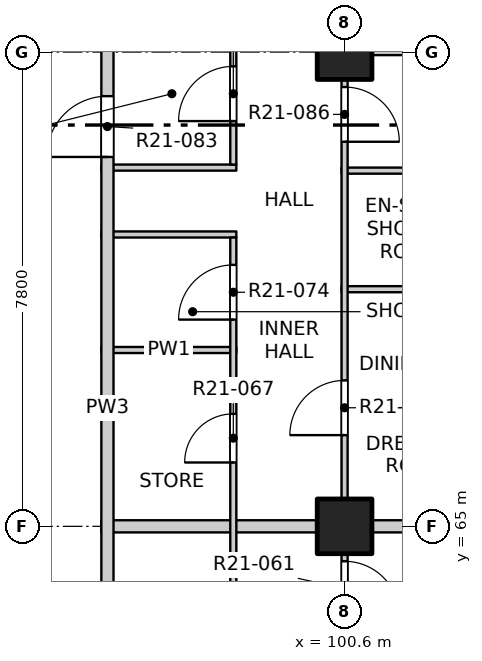
"""IFC4 building model, lengths in metres.
Left out: names, types, materials, properties, quantities, classifications, styles, units other than length and angle.
Written with IfcOpenShell. Run it as: python <this file> out.ifc"""

import sys

from ifc_helpers import new_model, si_unit, direction, frame, frame_2d, origin, origin_2d, place, context, subcontext, project, spatial, rectangle, extrude, element, fill, save


model = new_model("IFC4")
c1 = context("Model", 3, precision=1e-05, world=origin(), true_north=direction((0.0, 1.0)))
c2 = subcontext(c1, "Body", "Model", "MODEL_VIEW")
j1 = project(units=[si_unit("LENGTHUNIT", "METRE"), si_unit("PLANEANGLEUNIT", "RADIAN")], contexts=[c1])
p1 = place(None, origin())
s1 = spatial("IfcSite", under=j1, at=p1, CompositionType="ELEMENT")
p2 = place(p1, origin())
s2 = spatial("IfcBuilding", under=s1, at=p2, CompositionType="ELEMENT")
p3 = place(p2, frame((0.0, 0.0, 221.1)))
s3 = spatial("IfcBuildingStorey", under=s2, at=p3, CompositionType="ELEMENT", Elevation=221.1)
for number, where, z_axis, x_axis in (
    (1, (100.6, 65.0, -0.25), (0.0, 0.0, 1.0), (1.0, 0.0, 0.0)),
    (2, (100.6, 72.8, -0.25), (0.0, 0.0, 1.0), (1.0, 0.0, 0.0)),
):
    element("IfcColumn", number, at=place(p3, frame(where, z_axis=z_axis, x_axis=x_axis)), inside=s3, PredefinedType="COLUMN", context=c2, shape_type="SweptSolid", body=[
        extrude(rectangle(XDim=0.9, YDim=0.9, at=origin_2d()), origin(), (0.0, 0.0, 1.0), 3.4),
    ])
p4 = place(p3, frame((96.6, 65.0, 0.0), z_axis=(0.0, 0.0, 1.0), x_axis=(1.0, 0.0, 0.0)))
e3 = element("IfcWall", 3, at=p4, inside=s3, PredefinedType="PARTITIONING", context=c2, shape_type="SweptSolid", body=[
    extrude(rectangle(XDim=11.5, YDim=0.2, at=frame_2d((5.75, 0.0))), origin(), (0.0, 0.0, 1.0), 3.15),
])
p5 = place(p3, frame((96.6, 67.9, 0.0), z_axis=(0.0, 0.0, 1.0), x_axis=(1.0, 0.0, 0.0)))
e4 = element("IfcWall", 4, at=p5, inside=s3, PredefinedType="PARTITIONING", context=c2, shape_type="SweptSolid", body=[
    extrude(rectangle(XDim=2.22, YDim=0.1, at=frame_2d((1.11, 0.0))), origin(), (0.0, 0.0, 1.0), 3.15),
])
p6 = place(p3, frame((100.55, 68.9, 0.0), z_axis=(0.0, 0.0, 1.0), x_axis=(1.0, 0.0, 0.0)))
e5 = element("IfcWall", 5, at=p6, inside=s3, PredefinedType="PARTITIONING", context=c2, shape_type="SweptSolid", body=[
    extrude(rectangle(XDim=7.55, YDim=0.1, at=frame_2d((3.775, 0.0))), origin(), (0.0, 0.0, 1.0), 2.55),
])
p7 = place(p3, frame((96.6, 69.8, 0.0), z_axis=(0.0, 0.0, 1.0), x_axis=(1.0, 0.0, 0.0)))
e6 = element("IfcWall", 6, at=p7, inside=s3, PredefinedType="PARTITIONING", context=c2, shape_type="SweptSolid", body=[
    extrude(rectangle(XDim=2.22, YDim=0.1, at=frame_2d((1.11, 0.0))), origin(), (0.0, 0.0, 1.0), 3.15),
])
p8 = place(p3, frame((100.55, 70.85, 0.0), z_axis=(0.0, 0.0, 1.0), x_axis=(1.0, 0.0, 0.0)))
e7 = element("IfcWall", 7, at=p8, inside=s3, PredefinedType="PARTITIONING", context=c2, shape_type="SweptSolid", body=[
    extrude(rectangle(XDim=3.4, YDim=0.1, at=frame_2d((1.7, 0.0))), origin(), (0.0, 0.0, 1.0), 3.15),
])
p9 = place(p3, frame((96.6, 70.9, 0.0), z_axis=(0.0, 0.0, 1.0), x_axis=(1.0, 0.0, 0.0)))
e8 = element("IfcWall", 8, at=p9, inside=s3, PredefinedType="PARTITIONING", context=c2, shape_type="SweptSolid", body=[
    extrude(rectangle(XDim=2.22, YDim=0.1, at=frame_2d((1.11, 0.0))), origin(), (0.0, 0.0, 1.0), 3.15),
])
p10 = place(p3, frame((100.55, 72.8, 0.0), z_axis=(0.0, 0.0, 1.0), x_axis=(1.0, 0.0, 0.0)))
e9 = element("IfcWall", 9, at=p10, inside=s3, PredefinedType="PARTITIONING", context=c2, shape_type="SweptSolid", body=[
    extrude(rectangle(XDim=7.55, YDim=0.1, at=frame_2d((3.775, 0.0))), origin(), (0.0, 0.0, 1.0), 3.15),
])
p11 = place(p3, frame((96.7, 49.5, 0.0), z_axis=(0.0, 0.0, 1.0), x_axis=(0.0, 1.0, 0.0)))
e10 = element("IfcWall", 10, at=p11, inside=s3, PredefinedType="PARTITIONING", context=c2, shape_type="SweptSolid", body=[
    extrude(rectangle(XDim=34.9, YDim=0.2, at=frame_2d((17.45, 0.0))), origin(), (0.0, 0.0, 1.0), 3.15),
])
p12 = place(p11, frame((3.275, 0.0, 0.0)))
e11 = element("IfcOpeningElement", 11, at=p12, cuts=e10, PredefinedType="OPENING", context=c2, shape_type="SweptSolid", body=[
    extrude(rectangle(XDim=1.0, YDim=2.1, at=frame_2d((0.5, 1.05))), frame((0.0, 0.11, 0.0), z_axis=(0.0, -1.0, 0.0), x_axis=(1.0, 0.0, 0.0)), (0.0, 0.0, 1.0), 0.22),
])
p13 = place(p11, frame((10.825, 0.0, 0.0)))
e12 = element("IfcOpeningElement", 12, at=p13, cuts=e10, PredefinedType="OPENING", context=c2, shape_type="SweptSolid", body=[
    extrude(rectangle(XDim=1.0, YDim=2.1, at=frame_2d((0.5, 1.05))), frame((0.0, 0.11, 0.0), z_axis=(0.0, -1.0, 0.0), x_axis=(1.0, 0.0, 0.0)), (0.0, 0.0, 1.0), 0.22),
])
p14 = place(p11, frame((21.575, 0.0, 0.0)))
e13 = element("IfcOpeningElement", 13, at=p14, cuts=e10, PredefinedType="OPENING", context=c2, shape_type="SweptSolid", body=[
    extrude(rectangle(XDim=1.0, YDim=2.1, at=frame_2d((0.5, 1.05))), frame((0.0, 0.11, 0.0), z_axis=(0.0, -1.0, 0.0), x_axis=(1.0, 0.0, 0.0)), (0.0, 0.0, 1.0), 0.22),
])
p15 = place(p11, frame((30.575, 0.0, 0.0)))
e14 = element("IfcOpeningElement", 14, at=p15, cuts=e10, PredefinedType="OPENING", context=c2, shape_type="SweptSolid", body=[
    extrude(rectangle(XDim=1.0, YDim=2.1, at=frame_2d((0.5, 1.05))), frame((0.0, 0.11, 0.0), z_axis=(0.0, -1.0, 0.0), x_axis=(1.0, 0.0, 0.0)), (0.0, 0.0, 1.0), 0.22),
])
p16 = place(p3, frame((98.77, 60.2, 0.0), z_axis=(0.0, 0.0, 1.0), x_axis=(0.0, 1.0, 0.0)))
e15 = element("IfcWall", 15, at=p16, inside=s3, PredefinedType="PARTITIONING", context=c2, shape_type="SweptSolid", body=[
    extrude(rectangle(XDim=9.55, YDim=0.1, at=frame_2d((4.775, 0.0))), origin(), (0.0, 0.0, 1.0), 3.15),
])
p17 = place(p16, frame((0.55, 0.0, 0.0)))
e16 = element("IfcOpeningElement", 16, at=p17, cuts=e15, PredefinedType="OPENING", context=c2, shape_type="SweptSolid", body=[
    extrude(rectangle(XDim=0.8, YDim=2.1, at=frame_2d((0.4, 1.05))), frame((0.0, 0.06, 0.0), z_axis=(0.0, -1.0, 0.0), x_axis=(1.0, 0.0, 0.0)), (0.0, 0.0, 1.0), 0.12),
])
p18 = place(p16, frame((2.925, 0.0, 0.0)))
e17 = element("IfcOpeningElement", 17, at=p18, cuts=e15, PredefinedType="OPENING", context=c2, shape_type="SweptSolid", body=[
    extrude(rectangle(XDim=0.9, YDim=2.1, at=frame_2d((0.45, 1.05))), frame((0.0, 0.06, 0.0), z_axis=(0.0, -1.0, 0.0), x_axis=(1.0, 0.0, 0.0)), (0.0, 0.0, 1.0), 0.12),
])
p19 = place(p16, frame((5.85, 0.0, 0.0)))
e18 = element("IfcOpeningElement", 18, at=p19, cuts=e15, PredefinedType="OPENING", context=c2, shape_type="SweptSolid", body=[
    extrude(rectangle(XDim=0.8, YDim=2.1, at=frame_2d((0.4, 1.05))), frame((0.0, 0.06, 0.0), z_axis=(0.0, -1.0, 0.0), x_axis=(1.0, 0.0, 0.0)), (0.0, 0.0, 1.0), 0.12),
])
p20 = place(p16, frame((8.2, 0.0, 0.0)))
e19 = element("IfcOpeningElement", 19, at=p20, cuts=e15, PredefinedType="OPENING", context=c2, shape_type="SweptSolid", body=[
    extrude(rectangle(XDim=0.9, YDim=2.1, at=frame_2d((0.45, 1.05))), frame((0.0, 0.06, 0.0), z_axis=(0.0, -1.0, 0.0), x_axis=(1.0, 0.0, 0.0)), (0.0, 0.0, 1.0), 0.12),
])
p21 = place(p3, frame((98.77, 70.95, 0.0), z_axis=(0.0, 0.0, 1.0), x_axis=(0.0, 1.0, 0.0)))
e20 = element("IfcWall", 20, at=p21, inside=s3, PredefinedType="PARTITIONING", context=c2, shape_type="SweptSolid", body=[
    extrude(rectangle(XDim=7.8, YDim=0.1, at=frame_2d((3.9, 0.0))), origin(), (0.0, 0.0, 1.0), 3.15),
])
p22 = place(p21, frame((0.715, 0.0, 0.0)))
e21 = element("IfcOpeningElement", 21, at=p22, cuts=e20, PredefinedType="OPENING", context=c2, shape_type="SweptSolid", body=[
    extrude(rectangle(XDim=0.9, YDim=2.1, at=frame_2d((0.45, 1.05))), frame((0.0, 0.06, 0.0), z_axis=(0.0, -1.0, 0.0), x_axis=(1.0, 0.0, 0.0)), (0.0, 0.0, 1.0), 0.12),
])
p23 = place(p21, frame((3.615, 0.0, 0.0)))
e22 = element("IfcOpeningElement", 22, at=p23, cuts=e20, PredefinedType="OPENING", context=c2, shape_type="SweptSolid", body=[
    extrude(rectangle(XDim=0.9, YDim=2.1, at=frame_2d((0.45, 1.05))), frame((0.0, 0.06, 0.0), z_axis=(0.0, -1.0, 0.0), x_axis=(1.0, 0.0, 0.0)), (0.0, 0.0, 1.0), 0.12),
])
p24 = place(p21, frame((6.35, 0.0, 0.0)))
e23 = element("IfcOpeningElement", 23, at=p24, cuts=e20, PredefinedType="OPENING", context=c2, shape_type="SweptSolid", body=[
    extrude(rectangle(XDim=0.9, YDim=2.1, at=frame_2d((0.45, 1.05))), frame((0.0, 0.06, 0.0), z_axis=(0.0, -1.0, 0.0), x_axis=(1.0, 0.0, 0.0)), (0.0, 0.0, 1.0), 0.12),
])
p25 = place(p3, frame((100.6, 41.9, 0.0), z_axis=(0.0, 0.0, 1.0), x_axis=(0.0, 1.0, 0.0)))
e24 = element("IfcWall", 24, at=p25, inside=s3, PredefinedType="PARTITIONING", context=c2, shape_type="SweptSolid", body=[
    extrude(rectangle(XDim=46.2, YDim=0.1, at=frame_2d((23.1, 0.0))), origin(), (0.0, 0.0, 1.0), 3.15),
])
p26 = place(p25, frame((1.2, 0.0, 0.0)))
e25 = element("IfcOpeningElement", 25, at=p26, cuts=e24, PredefinedType="OPENING", context=c2, shape_type="SweptSolid", body=[
    extrude(rectangle(XDim=0.9, YDim=2.1, at=frame_2d((0.45, 1.05))), frame((0.0, 0.06, 0.0), z_axis=(0.0, -1.0, 0.0), x_axis=(1.0, 0.0, 0.0)), (0.0, 0.0, 1.0), 0.12),
])
p27 = place(p25, frame((6.025, 0.0, 0.0)))
e26 = element("IfcOpeningElement", 26, at=p27, cuts=e24, PredefinedType="OPENING", context=c2, shape_type="SweptSolid", body=[
    extrude(rectangle(XDim=0.9, YDim=2.1, at=frame_2d((0.45, 1.05))), frame((0.0, 0.06, 0.0), z_axis=(0.0, -1.0, 0.0), x_axis=(1.0, 0.0, 0.0)), (0.0, 0.0, 1.0), 0.12),
])
p28 = place(p25, frame((9.0, 0.0, 0.0)))
e27 = element("IfcOpeningElement", 27, at=p28, cuts=e24, PredefinedType="OPENING", context=c2, shape_type="SweptSolid", body=[
    extrude(rectangle(XDim=0.9, YDim=2.1, at=frame_2d((0.45, 1.05))), frame((0.0, 0.06, 0.0), z_axis=(0.0, -1.0, 0.0), x_axis=(1.0, 0.0, 0.0)), (0.0, 0.0, 1.0), 0.12),
])
p29 = place(p25, frame((13.85, 0.0, 0.0)))
e28 = element("IfcOpeningElement", 28, at=p29, cuts=e24, PredefinedType="OPENING", context=c2, shape_type="SweptSolid", body=[
    extrude(rectangle(XDim=0.9, YDim=2.1, at=frame_2d((0.45, 1.05))), frame((0.0, 0.06, 0.0), z_axis=(0.0, -1.0, 0.0), x_axis=(1.0, 0.0, 0.0)), (0.0, 0.0, 1.0), 0.12),
])
p30 = place(p25, frame((16.8, 0.0, 0.0)))
e29 = element("IfcOpeningElement", 29, at=p30, cuts=e24, PredefinedType="OPENING", context=c2, shape_type="SweptSolid", body=[
    extrude(rectangle(XDim=0.9, YDim=2.1, at=frame_2d((0.45, 1.05))), frame((0.0, 0.06, 0.0), z_axis=(0.0, -1.0, 0.0), x_axis=(1.0, 0.0, 0.0)), (0.0, 0.0, 1.0), 0.12),
])
p31 = place(p25, frame((21.625, 0.0, 0.0)))
e30 = element("IfcOpeningElement", 30, at=p31, cuts=e24, PredefinedType="OPENING", context=c2, shape_type="SweptSolid", body=[
    extrude(rectangle(XDim=0.9, YDim=2.1, at=frame_2d((0.45, 1.05))), frame((0.0, 0.06, 0.0), z_axis=(0.0, -1.0, 0.0), x_axis=(1.0, 0.0, 0.0)), (0.0, 0.0, 1.0), 0.12),
])
p32 = place(p25, frame((24.6, 0.0, 0.0)))
e31 = element("IfcOpeningElement", 31, at=p32, cuts=e24, PredefinedType="OPENING", context=c2, shape_type="SweptSolid", body=[
    extrude(rectangle(XDim=0.9, YDim=2.1, at=frame_2d((0.45, 1.05))), frame((0.0, 0.06, 0.0), z_axis=(0.0, -1.0, 0.0), x_axis=(1.0, 0.0, 0.0)), (0.0, 0.0, 1.0), 0.12),
])
p33 = place(p25, frame((29.425, 0.0, 0.0)))
e32 = element("IfcOpeningElement", 32, at=p33, cuts=e24, PredefinedType="OPENING", context=c2, shape_type="SweptSolid", body=[
    extrude(rectangle(XDim=0.9, YDim=2.1, at=frame_2d((0.45, 1.05))), frame((0.0, 0.06, 0.0), z_axis=(0.0, -1.0, 0.0), x_axis=(1.0, 0.0, 0.0)), (0.0, 0.0, 1.0), 0.12),
])
p34 = place(p25, frame((33.375, 0.0, 0.0)))
e33 = element("IfcOpeningElement", 33, at=p34, cuts=e24, PredefinedType="OPENING", context=c2, shape_type="SweptSolid", body=[
    extrude(rectangle(XDim=0.9, YDim=2.1, at=frame_2d((0.45, 1.05))), frame((0.0, 0.06, 0.0), z_axis=(0.0, -1.0, 0.0), x_axis=(1.0, 0.0, 0.0)), (0.0, 0.0, 1.0), 0.12),
])
p35 = place(p25, frame((36.3, 0.0, 0.0)))
e34 = element("IfcOpeningElement", 34, at=p35, cuts=e24, PredefinedType="OPENING", context=c2, shape_type="SweptSolid", body=[
    extrude(rectangle(XDim=0.9, YDim=2.1, at=frame_2d((0.45, 1.05))), frame((0.0, 0.06, 0.0), z_axis=(0.0, -1.0, 0.0), x_axis=(1.0, 0.0, 0.0)), (0.0, 0.0, 1.0), 0.12),
])
p36 = place(p25, frame((41.175, 0.0, 0.0)))
e35 = element("IfcOpeningElement", 35, at=p36, cuts=e24, PredefinedType="OPENING", context=c2, shape_type="SweptSolid", body=[
    extrude(rectangle(XDim=0.9, YDim=2.1, at=frame_2d((0.45, 1.05))), frame((0.0, 0.06, 0.0), z_axis=(0.0, -1.0, 0.0), x_axis=(1.0, 0.0, 0.0)), (0.0, 0.0, 1.0), 0.12),
])
p37 = place(p25, frame((44.1, 0.0, 0.0)))
e36 = element("IfcOpeningElement", 36, at=p37, cuts=e24, PredefinedType="OPENING", context=c2, shape_type="SweptSolid", body=[
    extrude(rectangle(XDim=0.9, YDim=2.1, at=frame_2d((0.45, 1.05))), frame((0.0, 0.06, 0.0), z_axis=(0.0, -1.0, 0.0), x_axis=(1.0, 0.0, 0.0)), (0.0, 0.0, 1.0), 0.12),
])
p38 = place(p31, origin())
e37 = element("IfcDoor", 37, at=p38, inside=s3, OperationType="SINGLE_SWING_RIGHT", PredefinedType="DOOR", context=c2, shape_type="SweptSolid", body=[
    extrude(rectangle(XDim=0.9, YDim=2.1, at=frame_2d((0.45, 1.05))), frame((0.0, 0.025, 0.0), z_axis=(0.0, -1.0, 0.0), x_axis=(1.0, 0.0, 0.0)), (0.0, 0.0, 1.0), 0.05),
])
fill(e30, e37)
p39 = place(p19, origin())
e38 = element("IfcDoor", 38, at=p39, inside=s3, OperationType="SINGLE_SWING_LEFT", PredefinedType="DOOR", context=c2, shape_type="SweptSolid", body=[
    extrude(rectangle(XDim=0.8, YDim=2.1, at=frame_2d((0.4, 1.05))), frame((0.0, 0.025, 0.0), z_axis=(0.0, -1.0, 0.0), x_axis=(1.0, 0.0, 0.0)), (0.0, 0.0, 1.0), 0.05),
])
fill(e18, e38)
p40 = place(p32, origin())
e39 = element("IfcDoor", 39, at=p40, inside=s3, OperationType="SINGLE_SWING_LEFT", PredefinedType="DOOR", context=c2, shape_type="SweptSolid", body=[
    extrude(rectangle(XDim=0.9, YDim=2.1, at=frame_2d((0.45, 1.05))), frame((0.0, 0.025, 0.0), z_axis=(0.0, -1.0, 0.0), x_axis=(1.0, 0.0, 0.0)), (0.0, 0.0, 1.0), 0.05),
])
fill(e31, e39)
p41 = place(p20, origin())
e40 = element("IfcDoor", 40, at=p41, inside=s3, OperationType="SINGLE_SWING_LEFT", PredefinedType="DOOR", context=c2, shape_type="SweptSolid", body=[
    extrude(rectangle(XDim=0.9, YDim=2.1, at=frame_2d((0.45, 1.05))), frame((0.0, 0.025, 0.0), z_axis=(0.0, -1.0, 0.0), x_axis=(1.0, 0.0, 0.0)), (0.0, 0.0, 1.0), 0.05),
])
fill(e19, e40)
p42 = place(p14, origin())
e41 = element("IfcDoor", 41, at=p42, inside=s3, OperationType="SINGLE_SWING_LEFT", PredefinedType="DOOR", context=c2, shape_type="SweptSolid", body=[
    extrude(rectangle(XDim=1.0, YDim=2.1, at=frame_2d((0.5, 1.05))), frame((0.0, 0.025, 0.0), z_axis=(0.0, -1.0, 0.0), x_axis=(1.0, 0.0, 0.0)), (0.0, 0.0, 1.0), 0.05),
])
fill(e13, e41)
p43 = place(p33, origin())
e42 = element("IfcDoor", 42, at=p43, inside=s3, OperationType="SINGLE_SWING_RIGHT", PredefinedType="DOOR", context=c2, shape_type="SweptSolid", body=[
    extrude(rectangle(XDim=0.9, YDim=2.1, at=frame_2d((0.45, 1.05))), frame((0.0, 0.025, 0.0), z_axis=(0.0, -1.0, 0.0), x_axis=(1.0, 0.0, 0.0)), (0.0, 0.0, 1.0), 0.05),
])
fill(e32, e42)
p44 = place(p22, origin())
e43 = element("IfcDoor", 43, at=p44, inside=s3, OperationType="SINGLE_SWING_LEFT", PredefinedType="DOOR", context=c2, shape_type="SweptSolid", body=[
    extrude(rectangle(XDim=0.9, YDim=2.1, at=frame_2d((0.45, 1.05))), frame((0.0, 0.025, 0.0), z_axis=(0.0, -1.0, 0.0), x_axis=(1.0, 0.0, 0.0)), (0.0, 0.0, 1.0), 0.05),
])
fill(e21, e43)
save(model, sys.argv[1])
